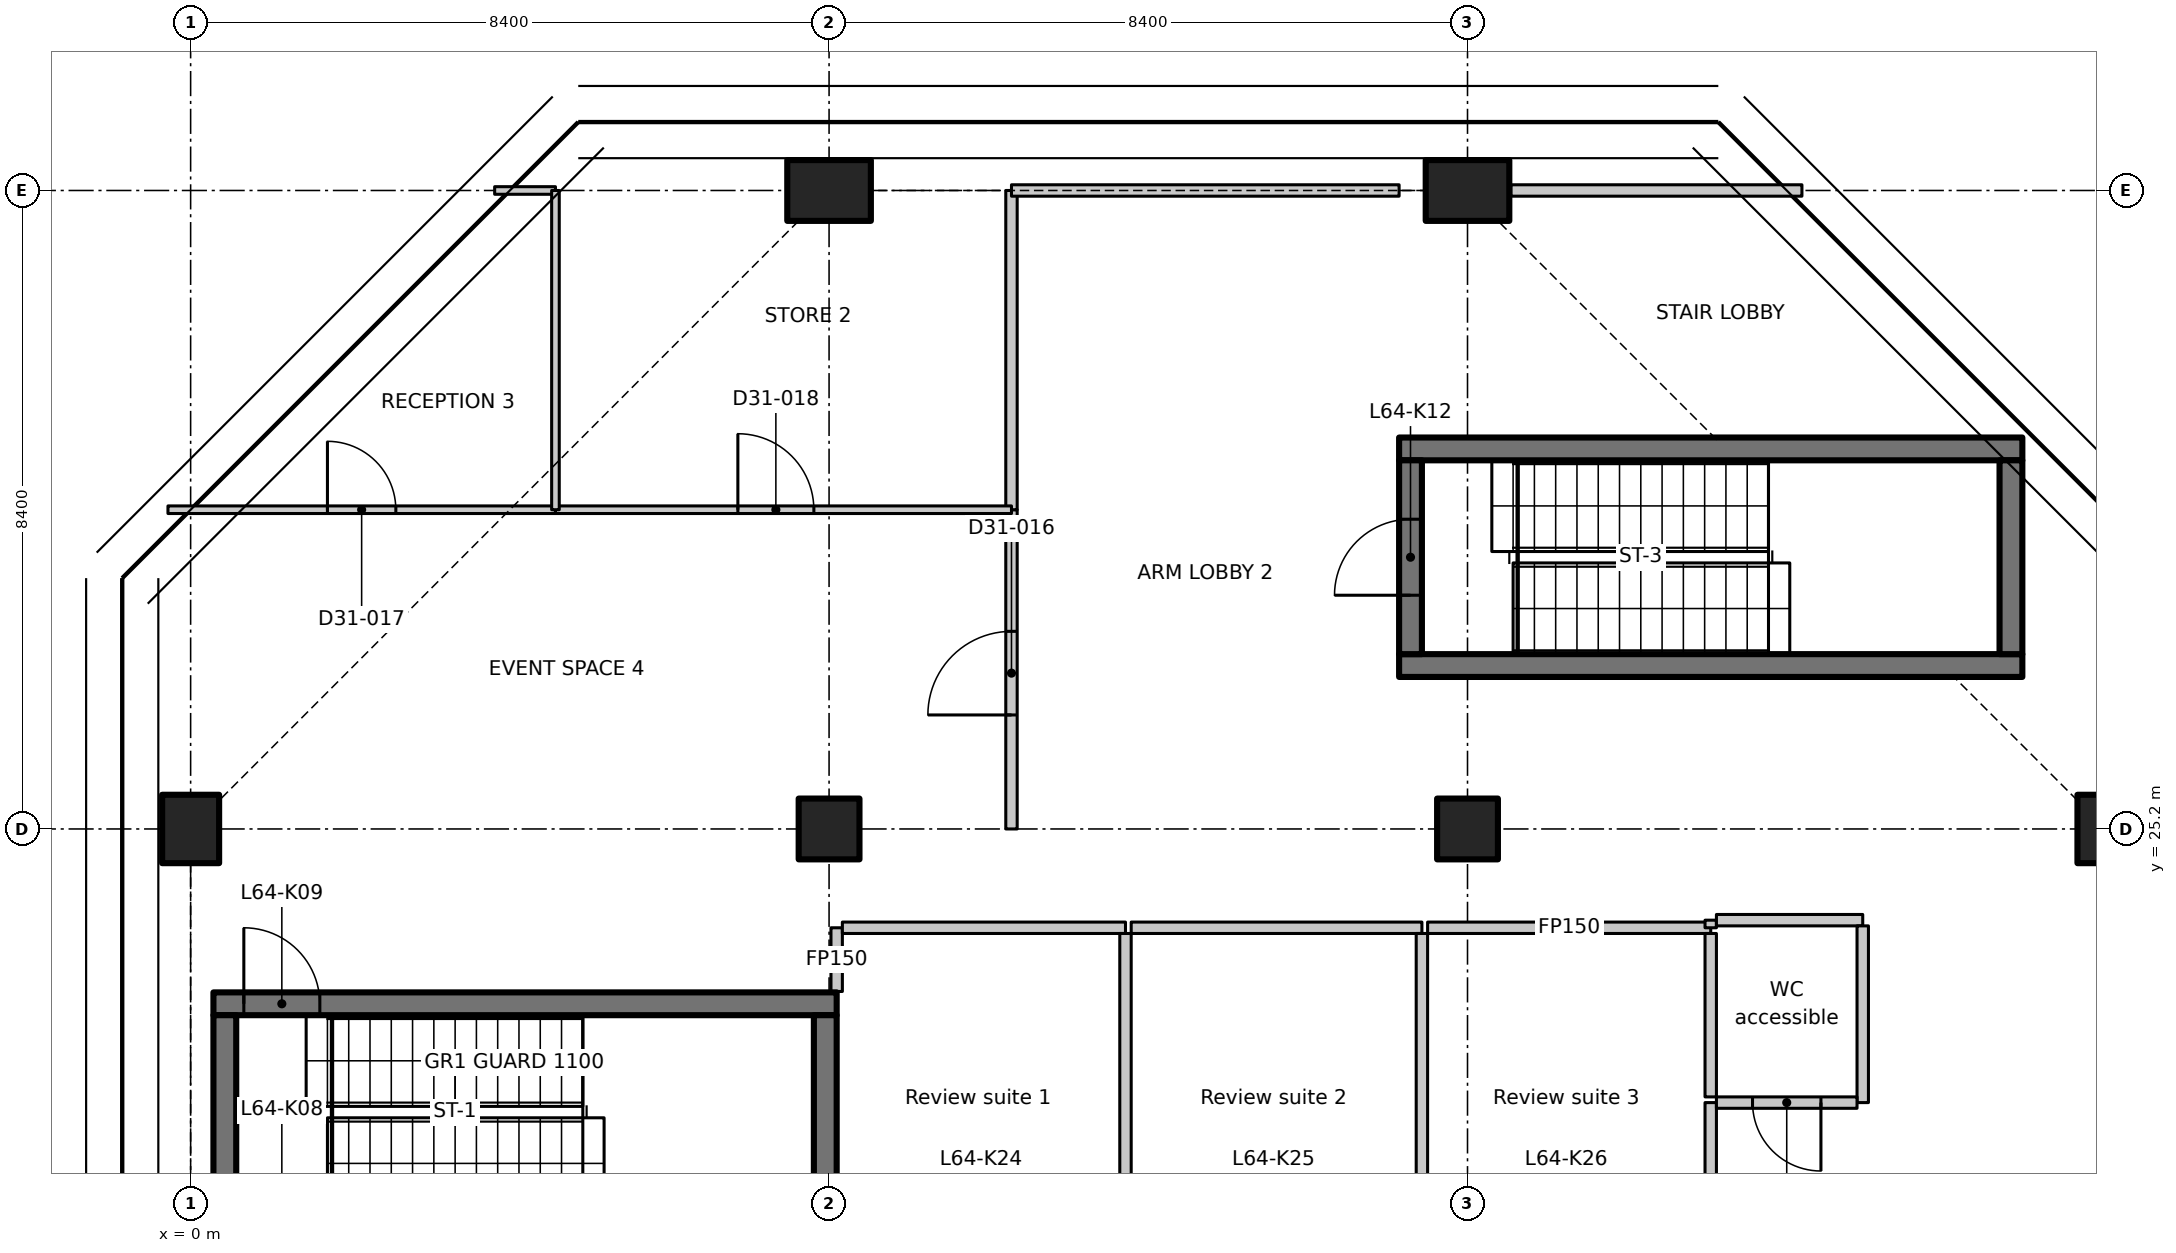
"""IFC4 building model, lengths in metres.
Left out: names, types, materials, properties, quantities, classifications, styles, units other than length and angle.
Written with IfcOpenShell. Run it as: python <this file> out.ifc"""

import sys

from ifc_helpers import new_model, si_unit, direction, frame, frame_2d, origin, origin_2d, place, context, subcontext, project, spatial, polyline, rectangle, outline, extrude, element, fill, save


model = new_model("IFC4")
c1 = context("Model", 3, precision=1e-05, world=origin(), true_north=direction((0.0, 1.0)))
c2 = subcontext(c1, "Body", "Model", "MODEL_VIEW")
j1 = project(units=[si_unit("LENGTHUNIT", "METRE"), si_unit("PLANEANGLEUNIT", "RADIAN")], contexts=[c1])
p1 = place(None, origin())
s1 = spatial("IfcSite", under=j1, at=p1, CompositionType="ELEMENT")
p2 = place(p1, origin())
s2 = spatial("IfcBuilding", under=s1, at=p2, CompositionType="ELEMENT")
p3 = place(p2, frame((0.0, 0.0, 251.7)))
s3 = spatial("IfcBuildingStorey", under=s2, at=p3, CompositionType="ELEMENT", Elevation=251.7)
p4 = place(p3, frame((0.0, 25.2, 0.0), z_axis=(0.0, 0.0, 1.0), x_axis=(1.0, 0.0, 0.0)))
e1 = element("IfcColumn", 1, at=p4, inside=s3, PredefinedType="COLUMN", context=c2, shape_type="SweptSolid", body=[
    extrude(rectangle(XDim=0.75, YDim=0.9, at=origin_2d()), origin(), (0.0, 0.0, 1.0), 4.05),
])
p5 = place(p3, frame((8.4, 25.2, 0.0), z_axis=(0.0, 0.0, 1.0), x_axis=(1.0, 0.0, 0.0)))
e2 = element("IfcColumn", 2, at=p5, inside=s3, PredefinedType="COLUMN", context=c2, shape_type="SweptSolid", body=[
    extrude(rectangle(XDim=0.8, YDim=0.8, at=origin_2d()), origin(), (0.0, 0.0, 1.0), 4.05),
])
p6 = place(p3, frame((8.4, 33.6, 0.0), z_axis=(0.0, 0.0, 1.0), x_axis=(0.0, 1.0, 0.0)))
e3 = element("IfcColumn", 3, at=p6, inside=s3, PredefinedType="COLUMN", context=c2, shape_type="SweptSolid", body=[
    extrude(rectangle(XDim=0.8, YDim=1.1, at=origin_2d()), origin(), (0.0, 0.0, 1.0), 4.05),
])
p7 = place(p3, frame((16.8, 25.2, 0.0), z_axis=(0.0, 0.0, 1.0), x_axis=(1.0, 0.0, 0.0)))
e4 = element("IfcColumn", 4, at=p7, inside=s3, PredefinedType="COLUMN", context=c2, shape_type="SweptSolid", body=[
    extrude(rectangle(XDim=0.8, YDim=0.8, at=origin_2d()), origin(), (0.0, 0.0, 1.0), 4.05),
])
p8 = place(p3, frame((16.8, 33.6, 0.0), z_axis=(0.0, 0.0, 1.0), x_axis=(0.0, 1.0, 0.0)))
e5 = element("IfcColumn", 5, at=p8, inside=s3, PredefinedType="COLUMN", context=c2, shape_type="SweptSolid", body=[
    extrude(rectangle(XDim=0.8, YDim=1.1, at=origin_2d()), origin(), (0.0, 0.0, 1.0), 4.05),
])
p9 = place(p3, frame((25.2, 25.2, 0.0), z_axis=(0.0, 0.0, 1.0), x_axis=(1.0, 0.0, 0.0)))
e6 = element("IfcColumn", 6, at=p9, inside=s3, PredefinedType="COLUMN", context=c2, shape_type="SweptSolid", body=[
    extrude(rectangle(XDim=0.75, YDim=0.9, at=origin_2d()), origin(), (0.0, 0.0, 1.0), 4.05),
])
p10 = place(p3, frame((0.3, 22.9, 0.0), z_axis=(0.0, 0.0, 1.0), x_axis=(1.0, 0.0, 0.0)))
e7 = element("IfcWall", 7, at=p10, inside=s3, PredefinedType="SHEAR", context=c2, shape_type="SweptSolid", body=[
    extrude(rectangle(XDim=8.2, YDim=0.3, at=frame_2d((4.1, 0.0))), origin(), (0.0, 0.0, 1.0), 4.05),
])
p11 = place(p10, frame((0.4, 0.0, 0.0)))
e8 = element("IfcOpeningElement", 8, at=p11, cuts=e7, PredefinedType="OPENING", context=c2, shape_type="SweptSolid", body=[
    extrude(rectangle(XDim=1.0, YDim=2.1, at=frame_2d((0.5, 1.05))), frame((0.0, 0.16, 0.0), z_axis=(0.0, -1.0, 0.0), x_axis=(1.0, 0.0, 0.0)), (0.0, 0.0, 1.0), 0.32),
])
for number, where, z_axis, x_axis in (
    (9, (0.45, 20.2, 0.0), (0.0, 0.0, 1.0), (0.0, 1.0, 0.0)),
    (10, (8.35, 20.2, 0.0), (0.0, 0.0, 1.0), (0.0, 1.0, 0.0)),
):
    element("IfcWall", number, at=place(p3, frame(where, z_axis=z_axis, x_axis=x_axis)), inside=s3, PredefinedType="SHEAR", context=c2, shape_type="SweptSolid", body=[
        extrude(rectangle(XDim=2.55, YDim=0.3, at=frame_2d((1.275, 0.0))), origin(), (0.0, 0.0, 1.0), 4.05),
    ])
for number, where, z_axis, x_axis in (
    (11, (15.9, 27.35, 0.0), (0.0, 0.0, 1.0), (1.0, 0.0, 0.0)),
    (12, (15.9, 30.2, 0.0), (0.0, 0.0, 1.0), (1.0, 0.0, 0.0)),
):
    element("IfcWall", number, at=place(p3, frame(where, z_axis=z_axis, x_axis=x_axis)), inside=s3, PredefinedType="SHEAR", context=c2, shape_type="SweptSolid", body=[
        extrude(rectangle(XDim=8.2, YDim=0.3, at=frame_2d((4.1, 0.0))), origin(), (0.0, 0.0, 1.0), 4.05),
    ])
p12 = place(p3, frame((16.05, 27.5, 0.0), z_axis=(0.0, 0.0, 1.0), x_axis=(0.0, 1.0, 0.0)))
e13 = element("IfcWall", 13, at=p12, inside=s3, PredefinedType="SHEAR", context=c2, shape_type="SweptSolid", body=[
    extrude(rectangle(XDim=2.55, YDim=0.3, at=frame_2d((1.275, 0.0))), origin(), (0.0, 0.0, 1.0), 4.05),
])
p13 = place(p12, frame((0.775, 0.0, 0.0)))
e14 = element("IfcOpeningElement", 14, at=p13, cuts=e13, PredefinedType="OPENING", context=c2, shape_type="SweptSolid", body=[
    extrude(rectangle(XDim=1.0, YDim=2.1, at=frame_2d((0.5, 1.05))), frame((0.0, 0.16, 0.0), z_axis=(0.0, -1.0, 0.0), x_axis=(1.0, 0.0, 0.0)), (0.0, 0.0, 1.0), 0.32),
])
p14 = place(p3, frame((23.95, 27.5, 0.0), z_axis=(0.0, 0.0, 1.0), x_axis=(0.0, 1.0, 0.0)))
e15 = element("IfcWall", 15, at=p14, inside=s3, PredefinedType="SHEAR", context=c2, shape_type="SweptSolid", body=[
    extrude(rectangle(XDim=2.55, YDim=0.3, at=frame_2d((1.275, 0.0))), origin(), (0.0, 0.0, 1.0), 4.05),
])
p15 = place(p3, frame((8.5, 23.062, 0.0), z_axis=(0.0, 0.0, 1.0), x_axis=(0.0, 1.0, 0.0)))
e16 = element("IfcWall", 16, at=p15, inside=s3, PredefinedType="PARTITIONING", context=c2, shape_type="SweptSolid", body=[
    extrude(rectangle(XDim=0.838, YDim=0.15, at=frame_2d((0.419, 0.0))), origin(), (0.0, 0.0, 1.0), 4.05),
])
p16 = place(p3, frame((8.575, 23.9, 0.0), z_axis=(0.0, 0.0, 1.0), x_axis=(1.0, 0.0, 0.0)))
e17 = element("IfcWall", 17, at=p16, inside=s3, PredefinedType="PARTITIONING", context=c2, shape_type="SweptSolid", body=[
    extrude(rectangle(XDim=3.725, YDim=0.15, at=frame_2d((1.863, 0.0))), origin(), (0.0, 0.0, 1.0), 4.05),
])
p17 = place(p3, frame((12.3, 23.825, 0.0), z_axis=(0.0, 0.0, 1.0), x_axis=(0.0, -1.0, 0.0)))
e18 = element("IfcWall", 18, at=p17, inside=s3, PredefinedType="PARTITIONING", context=c2, shape_type="SweptSolid", body=[
    extrude(rectangle(XDim=4.35, YDim=0.15, at=frame_2d((2.175, 0.0))), origin(), (0.0, 0.0, 1.0), 4.05),
])
p18 = place(p3, frame((12.375, 23.9, 0.0), z_axis=(0.0, 0.0, 1.0), x_axis=(1.0, 0.0, 0.0)))
e19 = element("IfcWall", 19, at=p18, inside=s3, PredefinedType="PARTITIONING", context=c2, shape_type="SweptSolid", body=[
    extrude(rectangle(XDim=3.825, YDim=0.15, at=frame_2d((1.913, 0.0))), origin(), (0.0, 0.0, 1.0), 4.05),
])
p19 = place(p3, frame((20.0, 21.6, 0.0), z_axis=(0.0, 0.0, 1.0), x_axis=(0.0, -1.0, 0.0)))
e20 = element("IfcWall", 20, at=p19, inside=s3, PredefinedType="PARTITIONING", context=c2, shape_type="SweptSolid", body=[
    extrude(rectangle(XDim=2.2, YDim=0.15, at=frame_2d((1.1, 0.0))), origin(), (0.0, 0.0, 1.0), 4.05),
])
p20 = place(p3, frame((16.2, 23.825, 0.0), z_axis=(0.0, 0.0, 1.0), x_axis=(0.0, -1.0, 0.0)))
e21 = element("IfcWall", 21, at=p20, inside=s3, PredefinedType="PARTITIONING", context=c2, shape_type="SweptSolid", body=[
    extrude(rectangle(XDim=4.35, YDim=0.15, at=frame_2d((2.175, 0.0))), origin(), (0.0, 0.0, 1.0), 4.05),
])
p21 = place(p3, frame((16.275, 23.9, 0.0), z_axis=(0.0, 0.0, 1.0), x_axis=(1.0, 0.0, 0.0)))
e22 = element("IfcWall", 22, at=p21, inside=s3, PredefinedType="PARTITIONING", context=c2, shape_type="SweptSolid", body=[
    extrude(rectangle(XDim=3.725, YDim=0.15, at=frame_2d((1.863, 0.0))), origin(), (0.0, 0.0, 1.0), 4.05),
])
p22 = place(p3, frame((20.0, 23.9, 0.0), z_axis=(0.0, 0.0, 1.0), x_axis=(0.0, 1.0, 0.0)))
e23 = element("IfcWall", 23, at=p22, inside=s3, PredefinedType="PARTITIONING", context=c2, shape_type="SweptSolid", body=[
    extrude(rectangle(XDim=0.1, YDim=0.15, at=frame_2d((0.05, 0.0))), origin(), (0.0, 0.0, 1.0), 4.05),
])
p23 = place(p3, frame((20.075, 24.0, 0.0), z_axis=(0.0, 0.0, 1.0), x_axis=(1.0, 0.0, 0.0)))
e24 = element("IfcWall", 24, at=p23, inside=s3, PredefinedType="PARTITIONING", context=c2, shape_type="SweptSolid", body=[
    extrude(rectangle(XDim=1.925, YDim=0.15, at=frame_2d((0.962, 0.0))), origin(), (0.0, 0.0, 1.0), 4.05),
])
p24 = place(p3, frame((22.0, 23.925, 0.0), z_axis=(0.0, 0.0, 1.0), x_axis=(0.0, -1.0, 0.0)))
e25 = element("IfcWall", 25, at=p24, inside=s3, PredefinedType="PARTITIONING", context=c2, shape_type="SweptSolid", body=[
    extrude(rectangle(XDim=2.325, YDim=0.15, at=frame_2d((1.163, 0.0))), origin(), (0.0, 0.0, 1.0), 4.05),
])
p25 = place(p3, frame((21.925, 21.6, 0.0), z_axis=(0.0, 0.0, 1.0), x_axis=(-1.0, 0.0, 0.0)))
e26 = element("IfcWall", 26, at=p25, inside=s3, PredefinedType="PARTITIONING", context=c2, shape_type="SweptSolid", body=[
    extrude(rectangle(XDim=1.85, YDim=0.15, at=frame_2d((0.925, 0.0))), origin(), (0.0, 0.0, 1.0), 4.05),
])
p26 = place(p25, frame((0.475, 0.0, 0.0)))
e27 = element("IfcOpeningElement", 27, at=p26, cuts=e26, PredefinedType="OPENING", context=c2, shape_type="SweptSolid", body=[
    extrude(rectangle(XDim=0.9, YDim=2.1, at=frame_2d((0.45, 1.05))), frame((0.0, 0.085, 0.0), z_axis=(0.0, -1.0, 0.0), x_axis=(1.0, 0.0, 0.0)), (0.0, 0.0, 1.0), 0.17),
])
p27 = place(p3, frame((20.0, 21.675, 0.0), z_axis=(0.0, 0.0, 1.0), x_axis=(0.0, 1.0, 0.0)))
e28 = element("IfcWall", 28, at=p27, inside=s3, PredefinedType="PARTITIONING", context=c2, shape_type="SweptSolid", body=[
    extrude(rectangle(XDim=2.15, YDim=0.15, at=frame_2d((1.075, 0.0))), origin(), (0.0, 0.0, 1.0), 4.05),
])
p28 = place(p3, frame((10.8, 25.2, 0.0), z_axis=(0.0, 0.0, 1.0), x_axis=(0.0, 1.0, 0.0)))
e29 = element("IfcWall", 29, at=p28, inside=s3, PredefinedType="PARTITIONING", context=c2, shape_type="SweptSolid", body=[
    extrude(rectangle(XDim=4.2, YDim=0.15, at=frame_2d((2.1, 0.0))), origin(), (0.0, 0.0, 1.0), 4.03),
])
p29 = place(p28, frame((1.5, 0.0, 0.0)))
e30 = element("IfcOpeningElement", 30, at=p29, cuts=e29, PredefinedType="OPENING", context=c2, shape_type="SweptSolid", body=[
    extrude(rectangle(XDim=1.1, YDim=2.1, at=frame_2d((0.55, 1.05))), frame((0.0, 0.085, 0.0), z_axis=(0.0, -1.0, 0.0), x_axis=(1.0, 0.0, 0.0)), (0.0, 0.0, 1.0), 0.17),
])
p30 = place(p3, frame((10.8, 29.4, 0.0), z_axis=(0.0, 0.0, 1.0), x_axis=(0.0, 1.0, 0.0)))
e31 = element("IfcWall", 31, at=p30, inside=s3, PredefinedType="PARTITIONING", context=c2, shape_type="SweptSolid", body=[
    extrude(rectangle(XDim=4.2, YDim=0.15, at=frame_2d((2.1, 0.0))), origin(), (0.0, 0.0, 1.0), 3.68),
])
p31 = place(p3, frame((10.8, 33.6, 0.0), z_axis=(0.0, 0.0, 1.0), x_axis=(1.0, 0.0, 0.0)))
e32 = element("IfcWall", 32, at=p31, inside=s3, PredefinedType="PARTITIONING", context=c2, shape_type="SweptSolid", body=[
    extrude(outline(polyline([(0.0, 0.0), (5.1, 0.0), (5.1, 3.68), (0.0, 3.68), (0.0, 0.0)])), frame((0.0, 0.075, 0.0), z_axis=(0.0, -1.0, 0.0), x_axis=(1.0, 0.0, 0.0)), (0.0, 0.0, 1.0), 0.15),
])
p32 = place(p3, frame((17.37, 33.6, 0.0), z_axis=(0.0, 0.0, 1.0), x_axis=(1.0, 0.0, 0.0)))
e33 = element("IfcWall", 33, at=p32, inside=s3, PredefinedType="PARTITIONING", context=c2, shape_type="SweptSolid", body=[
    extrude(rectangle(XDim=3.83, YDim=0.15, at=frame_2d((1.915, 0.0))), origin(), (0.0, 0.0, 1.0), 3.68),
])
p33 = place(p3, frame((-0.298, 29.4, 0.0), z_axis=(0.0, 0.0, 1.0), x_axis=(1.0, 0.0, 0.0)))
e34 = element("IfcWall", 34, at=p33, inside=s3, PredefinedType="PARTITIONING", context=c2, shape_type="SweptSolid", body=[
    extrude(outline(polyline([(0.0, 0.0), (5.098, 0.0), (5.098, 3.68), (3.835, 3.68), (3.833, 4.03), (0.098, 4.03), (0.0, 4.03), (0.0, 0.0)])), frame((0.0, 0.05, 0.0), z_axis=(0.0, -1.0, 0.0), x_axis=(1.0, 0.0, 0.0)), (0.0, 0.0, 1.0), 0.1),
])
p34 = place(p33, frame((2.098, 0.0, 0.0)))
e35 = element("IfcOpeningElement", 35, at=p34, cuts=e34, PredefinedType="OPENING", context=c2, shape_type="SweptSolid", body=[
    extrude(rectangle(XDim=0.9, YDim=2.1, at=frame_2d((0.45, 1.05))), frame((0.0, 0.06, 0.0), z_axis=(0.0, -1.0, 0.0), x_axis=(1.0, 0.0, 0.0)), (0.0, 0.0, 1.0), 0.12),
])
p35 = place(p3, frame((4.8, 29.4, 0.0), z_axis=(0.0, 0.0, 1.0), x_axis=(1.0, 0.0, 0.0)))
e36 = element("IfcWall", 36, at=p35, inside=s3, PredefinedType="PARTITIONING", context=c2, shape_type="SweptSolid", body=[
    extrude(outline(polyline([(0.0, 0.0), (6.0, 0.0), (6.0, 4.03), (0.066, 4.03), (0.064, 3.68), (0.0, 3.68), (0.0, 0.0)])), frame((0.0, 0.05, 0.0), z_axis=(0.0, -1.0, 0.0), x_axis=(1.0, 0.0, 0.0)), (0.0, 0.0, 1.0), 0.1),
])
p36 = place(p35, frame((2.4, 0.0, 0.0)))
e37 = element("IfcOpeningElement", 37, at=p36, cuts=e36, PredefinedType="OPENING", context=c2, shape_type="SweptSolid", body=[
    extrude(rectangle(XDim=1.0, YDim=2.1, at=frame_2d((0.5, 1.05))), frame((0.0, 0.06, 0.0), z_axis=(0.0, -1.0, 0.0), x_axis=(1.0, 0.0, 0.0)), (0.0, 0.0, 1.0), 0.12),
])
p37 = place(p3, frame((4.0, 33.6, 0.0), z_axis=(0.0, 0.0, 1.0), x_axis=(1.0, 0.0, 0.0)))
e38 = element("IfcWall", 38, at=p37, inside=s3, PredefinedType="PARTITIONING", context=c2, shape_type="SweptSolid", body=[
    extrude(rectangle(XDim=0.8, YDim=0.1, at=frame_2d((0.4, 0.0))), origin(), (0.0, 0.0, 1.0), 4.03),
])
p38 = place(p3, frame((4.8, 33.6, 0.0), z_axis=(0.0, 0.0, 1.0), x_axis=(0.0, -1.0, 0.0)))
e39 = element("IfcWall", 39, at=p38, inside=s3, PredefinedType="PARTITIONING", context=c2, shape_type="SweptSolid", body=[
    extrude(rectangle(XDim=4.2, YDim=0.1, at=frame_2d((2.1, 0.0))), origin(), (0.0, 0.0, 1.0), 3.68),
])
p39 = place(p11, origin())
e40 = element("IfcDoor", 40, at=p39, inside=s3, OperationType="SINGLE_SWING_LEFT", PredefinedType="DOOR", context=c2, shape_type="SweptSolid", body=[
    extrude(rectangle(XDim=1.0, YDim=2.1, at=frame_2d((0.5, 1.05))), frame((0.0, 0.025, 0.0), z_axis=(0.0, -1.0, 0.0), x_axis=(1.0, 0.0, 0.0)), (0.0, 0.0, 1.0), 0.05),
])
fill(e8, e40)
p40 = place(p13, origin())
e41 = element("IfcDoor", 41, at=p40, inside=s3, OperationType="SINGLE_SWING_RIGHT", PredefinedType="DOOR", context=c2, shape_type="SweptSolid", body=[
    extrude(rectangle(XDim=1.0, YDim=2.1, at=frame_2d((0.5, 1.05))), frame((0.0, 0.025, 0.0), z_axis=(0.0, -1.0, 0.0), x_axis=(1.0, 0.0, 0.0)), (0.0, 0.0, 1.0), 0.05),
])
fill(e14, e41)
p41 = place(p26, origin())
e42 = element("IfcDoor", 42, at=p41, inside=s3, OperationType="SINGLE_SWING_LEFT", PredefinedType="DOOR", context=c2, shape_type="SweptSolid", body=[
    extrude(rectangle(XDim=0.9, YDim=2.1, at=frame_2d((0.45, 1.05))), frame((0.0, 0.025, 0.0), z_axis=(0.0, -1.0, 0.0), x_axis=(1.0, 0.0, 0.0)), (0.0, 0.0, 1.0), 0.05),
])
fill(e27, e42)
p42 = place(p29, origin())
e43 = element("IfcDoor", 43, at=p42, inside=s3, OperationType="SINGLE_SWING_LEFT", PredefinedType="DOOR", context=c2, shape_type="SweptSolid", body=[
    extrude(rectangle(XDim=1.1, YDim=2.1, at=frame_2d((0.55, 1.05))), frame((0.0, 0.025, 0.0), z_axis=(0.0, -1.0, 0.0), x_axis=(1.0, 0.0, 0.0)), (0.0, 0.0, 1.0), 0.05),
])
fill(e30, e43)
p43 = place(p34, origin())
e44 = element("IfcDoor", 44, at=p43, inside=s3, OperationType="SINGLE_SWING_LEFT", PredefinedType="DOOR", context=c2, shape_type="SweptSolid", body=[
    extrude(rectangle(XDim=0.9, YDim=2.1, at=frame_2d((0.45, 1.05))), frame((0.0, 0.025, 0.0), z_axis=(0.0, -1.0, 0.0), x_axis=(1.0, 0.0, 0.0)), (0.0, 0.0, 1.0), 0.05),
])
fill(e35, e44)
p44 = place(p36, origin())
e45 = element("IfcDoor", 45, at=p44, inside=s3, OperationType="SINGLE_SWING_LEFT", PredefinedType="DOOR", context=c2, shape_type="SweptSolid", body=[
    extrude(rectangle(XDim=1.0, YDim=2.1, at=frame_2d((0.5, 1.05))), frame((0.0, 0.025, 0.0), z_axis=(0.0, -1.0, 0.0), x_axis=(1.0, 0.0, 0.0)), (0.0, 0.0, 1.0), 0.05),
])
fill(e37, e45)
save(model, sys.argv[1])
